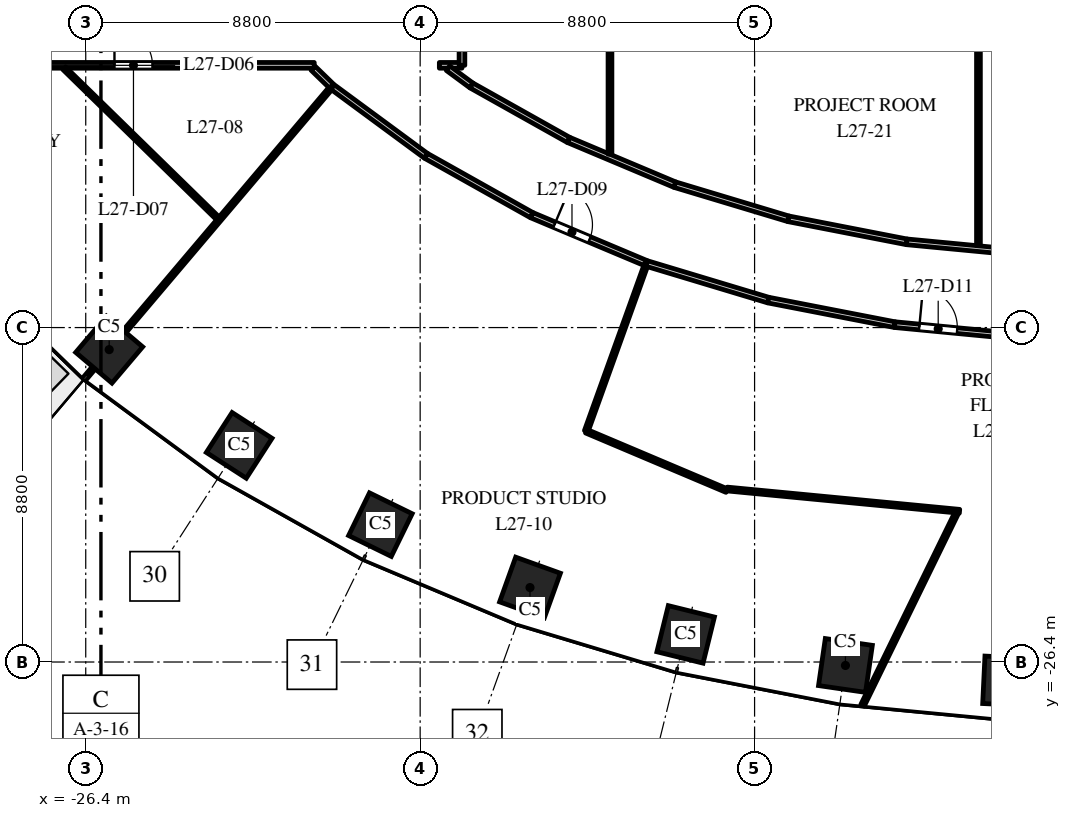
"""IFC4 building model, lengths in metres.
Left out: names, types, materials, properties, quantities, classifications, styles, units other than length and angle.
Written with IfcOpenShell. Run it as: python <this file> out.ifc"""

import sys

from ifc_helpers import new_model, si_unit, direction, frame, frame_2d, origin, origin_2d, place, context, subcontext, project, spatial, rectangle, extrude, element, fill, save


model = new_model("IFC4")
c1 = context("Model", 3, precision=1e-05, world=origin(), true_north=direction((0.0, 1.0)))
c2 = subcontext(c1, "Body", "Model", "MODEL_VIEW")
j1 = project(units=[si_unit("LENGTHUNIT", "METRE"), si_unit("PLANEANGLEUNIT", "RADIAN")], contexts=[c1])
p1 = place(None, origin())
s1 = spatial("IfcSite", under=j1, at=p1, CompositionType="ELEMENT")
p2 = place(p1, origin())
s2 = spatial("IfcBuilding", under=s1, at=p2, CompositionType="ELEMENT")
p3 = place(p2, frame((0.0, 0.0, 120.0)))
s3 = spatial("IfcBuildingStorey", under=s2, at=p3, CompositionType="ELEMENT", Elevation=120.0)
for number, where, z_axis, x_axis in (
    (1, (-25.783, -18.18, 0.0), (0.0, 0.0, 1.0), (0.763, -0.646, 0.0)),
    (2, (-22.362, -20.7, 0.0), (0.0, 0.0, 1.0), (0.84, -0.542, 0.0)),
    (3, (-18.646, -22.785, 0.0), (0.0, 0.0, 1.0), (0.898, -0.439, 0.0)),
    (4, (-14.709, -24.441, 0.0), (0.0, 0.0, 1.0), (0.941, -0.338, 0.0)),
    (5, (-10.613, -25.674, 0.0), (0.0, 0.0, 1.0), (0.971, -0.24, 0.0)),
    (6, (-6.409, -26.491, 0.0), (0.0, 0.0, 1.0), (0.99, -0.143, 0.0)),
    (7, (-2.143, -26.898, 0.0), (0.0, 0.0, 1.0), (0.999, -0.048, 0.0)),
):
    element("IfcColumn", number, at=place(p3, frame(where, z_axis=z_axis, x_axis=x_axis)), inside=s3, PredefinedType="COLUMN", context=c2, shape_type="SweptSolid", body=[
        extrude(rectangle(XDim=1.25, YDim=1.25, at=origin_2d()), origin(), (0.0, 0.0, 1.0), 4.0),
    ])
p4 = place(p3, frame((-31.5, -10.7, 0.0), z_axis=(0.0, 0.0, 1.0), x_axis=(1.0, 0.0, 0.0)))
e8 = element("IfcWall", 8, at=p4, inside=s3, PredefinedType="PARTITIONING", context=c2, shape_type="SweptSolid", body=[
    extrude(rectangle(XDim=11.113, YDim=0.15, at=frame_2d((5.557, 0.0))), origin(), (0.0, 0.0, 1.0), 3.1),
])
p5 = place(p4, frame((2.9, 0.0, 0.0)))
e9 = element("IfcOpeningElement", 9, at=p5, cuts=e8, PredefinedType="OPENING", context=c2, shape_type="SweptSolid", body=[
    extrude(rectangle(XDim=1.0, YDim=2.1, at=frame_2d((0.5, 1.05))), frame((0.0, 0.085, 0.0), z_axis=(0.0, -1.0, 0.0), x_axis=(1.0, 0.0, 0.0)), (0.0, 0.0, 1.0), 0.17),
])
p6 = place(p4, frame((5.856, 0.0, 0.0)))
e10 = element("IfcOpeningElement", 10, at=p6, cuts=e8, PredefinedType="OPENING", context=c2, shape_type="SweptSolid", body=[
    extrude(rectangle(XDim=1.0, YDim=2.1, at=frame_2d((0.5, 1.05))), frame((0.0, 0.085, 0.0), z_axis=(0.0, -1.0, 0.0), x_axis=(1.0, 0.0, 0.0)), (0.0, 0.0, 1.0), 0.17),
])
p7 = place(p3, frame((-26.965, -10.778, 0.0), z_axis=(0.0, 0.0, 1.0), x_axis=(0.715118482903, -0.699003258512, 0.0)))
e11 = element("IfcWall", 11, at=p7, inside=s3, PredefinedType="PARTITIONING", context=c2, shape_type="SweptSolid", body=[
    extrude(rectangle(XDim=5.651, YDim=0.1, at=frame_2d((2.825, 0.0))), origin(), (0.0, 0.0, 1.0), 3.7),
])
p8 = place(p3, frame((-26.43, -18.945, 0.0), z_axis=(0.0, 0.0, 1.0), x_axis=(0.64633128205, 0.763056927, 0.0)))
e12 = element("IfcWall", 12, at=p8, inside=s3, PredefinedType="PARTITIONING", context=c2, shape_type="SweptSolid", body=[
    extrude(rectangle(XDim=10.069, YDim=0.1, at=frame_2d((5.034, 0.0))), origin(), (0.0, 0.0, 1.0), 3.7),
])
p9 = place(p3, frame((-20.418, -10.775, 0.0), z_axis=(0.0, 0.0, 1.0), x_axis=(0.717145300924, -0.69692368116, 0.0)))
e13 = element("IfcWall", 13, at=p9, inside=s3, PredefinedType="PARTITIONING", context=c2, shape_type="SweptSolid", body=[
    extrude(rectangle(XDim=0.676, YDim=0.15, at=frame_2d((0.338, 0.0))), origin(), (0.0, 0.0, 1.0), 3.7),
])
p10 = place(p3, frame((-19.903, -11.272, 0.0), z_axis=(0.0, 0.0, 1.0), x_axis=(0.805228684186, -0.592964388613, 0.0)))
e14 = element("IfcWall", 14, at=p10, inside=s3, PredefinedType="PARTITIONING", context=c2, shape_type="SweptSolid", body=[
    extrude(rectangle(XDim=3.052, YDim=0.15, at=frame_2d((1.526, 0.0))), origin(), (0.0, 0.0, 1.0), 2.75),
])
p11 = place(p3, frame((-17.445, -13.082, 0.0), z_axis=(0.0, 0.0, 1.0), x_axis=(0.872072095629, -0.489377420837, 0.0)))
e15 = element("IfcWall", 15, at=p11, inside=s3, PredefinedType="PARTITIONING", context=c2, shape_type="SweptSolid", body=[
    extrude(rectangle(XDim=3.188, YDim=0.15, at=frame_2d((1.594, 0.0))), origin(), (0.0, 0.0, 1.0), 3.7),
])
p12 = place(p3, frame((-17.095, -10.7, 0.0), z_axis=(0.0, 0.0, 1.0), x_axis=(1.0, 0.0, 0.0)))
e16 = element("IfcWall", 16, at=p12, inside=s3, PredefinedType="PARTITIONING", context=c2, shape_type="SweptSolid", body=[
    extrude(rectangle(XDim=0.595, YDim=0.15, at=frame_2d((0.297, 0.0))), origin(), (0.0, 0.0, 1.0), 3.7),
])
p13 = place(p3, frame((-16.867, -10.775, 0.0), z_axis=(0.0, 0.0, 1.0), x_axis=(0.804751563869, -0.593611759023, 0.0)))
e17 = element("IfcWall", 17, at=p13, inside=s3, PredefinedType="PARTITIONING", context=c2, shape_type="SweptSolid", body=[
    extrude(rectangle(XDim=0.767, YDim=0.15, at=frame_2d((0.383, 0.0))), origin(), (0.0, 0.0, 1.0), 3.7),
])
p14 = place(p3, frame((-16.5, -10.7, 0.0), z_axis=(0.0, 0.0, 1.0), x_axis=(0.0, 1.0, 0.0)))
e18 = element("IfcWall", 18, at=p14, inside=s3, PredefinedType="PARTITIONING", context=c2, shape_type="SweptSolid", body=[
    extrude(rectangle(XDim=0.736, YDim=0.15, at=frame_2d((0.368, 0.0))), origin(), (0.0, 0.0, 1.0), 3.7),
])
p15 = place(p3, frame((-16.25, -11.23, 0.0), z_axis=(0.0, 0.0, 1.0), x_axis=(0.872147381065, -0.489243237767, 0.0)))
e19 = element("IfcWall", 19, at=p15, inside=s3, PredefinedType="PARTITIONING", context=c2, shape_type="SweptSolid", body=[
    extrude(rectangle(XDim=2.927, YDim=0.15, at=frame_2d((1.464, 0.0))), origin(), (0.0, 0.0, 1.0), 2.75),
])
p16 = place(p3, frame((-14.665, -14.642, 0.0), z_axis=(0.0, 0.0, 1.0), x_axis=(0.921850993012, -0.387544509293, 0.0)))
e20 = element("IfcWall", 20, at=p16, inside=s3, PredefinedType="PARTITIONING", context=c2, shape_type="SweptSolid", body=[
    extrude(rectangle(XDim=3.259, YDim=0.15, at=frame_2d((1.629, 0.0))), origin(), (0.0, 0.0, 1.0), 2.85),
])
p17 = place(p16, frame((0.65, 0.0, 0.0)))
e21 = element("IfcOpeningElement", 21, at=p17, cuts=e20, PredefinedType="OPENING", context=c2, shape_type="SweptSolid", body=[
    extrude(rectangle(XDim=1.0, YDim=2.1, at=frame_2d((0.5, 1.05))), frame((0.0, 0.085, 0.0), z_axis=(0.0, -1.0, 0.0), x_axis=(1.0, 0.0, 0.0)), (0.0, 0.0, 1.0), 0.17),
])
p18 = place(p3, frame((-13.697, -12.662, 0.0), z_axis=(0.0, 0.0, 1.0), x_axis=(0.921751821358, -0.387780324183, 0.0)))
e22 = element("IfcWall", 22, at=p18, inside=s3, PredefinedType="PARTITIONING", context=c2, shape_type="SweptSolid", body=[
    extrude(rectangle(XDim=3.038, YDim=0.15, at=frame_2d((1.519, 0.0))), origin(), (0.0, 0.0, 1.0), 2.85),
])
p19 = place(p3, frame((-13.23, -20.327, 0.0), z_axis=(0.0, 0.0, 1.0), x_axis=(0.338411379185, 0.940998266969, 0.0)))
e23 = element("IfcWall", 23, at=p19, inside=s3, PredefinedType="PARTITIONING", context=c2, shape_type="SweptSolid", body=[
    extrude(rectangle(XDim=4.687, YDim=0.1, at=frame_2d((2.343, 0.0))), origin(), (0.0, 0.0, 1.0), 3.7),
])
p20 = place(p3, frame((-13.23, -20.327, 0.0), z_axis=(0.0, 0.0, 1.0), x_axis=(0.921068797825, -0.389399884017, 0.0)))
e24 = element("IfcWall", 24, at=p20, inside=s3, PredefinedType="PARTITIONING", context=c2, shape_type="SweptSolid", body=[
    extrude(rectangle(XDim=4.014, YDim=0.1, at=frame_2d((2.007, 0.0))), origin(), (0.0, 0.0, 1.0), 3.7),
])
p21 = place(p3, frame((-12.605, -13.036, 0.0), z_axis=(0.0, 0.0, 1.0), x_axis=(0.0, 1.0, 0.0)))
e25 = element("IfcWall", 25, at=p21, inside=s3, PredefinedType="PARTITIONING", context=c2, shape_type="SweptSolid", body=[
    extrude(rectangle(XDim=26.072, YDim=0.1, at=frame_2d((13.036, 0.0))), origin(), (0.0, 0.0, 1.0), 2.75),
])
p22 = place(p3, frame((-11.643, -15.913, 0.0), z_axis=(0.0, 0.0, 1.0), x_axis=(0.957584891346, -0.288151307243, 0.0)))
e26 = element("IfcWall", 26, at=p22, inside=s3, PredefinedType="PARTITIONING", context=c2, shape_type="SweptSolid", body=[
    extrude(rectangle(XDim=3.345, YDim=0.15, at=frame_2d((1.672, 0.0))), origin(), (0.0, 0.0, 1.0), 3.7),
])
p23 = place(p3, frame((-10.897, -13.84, 0.0), z_axis=(0.0, 0.0, 1.0), x_axis=(0.957606118849, -0.28808075455, 0.0)))
e27 = element("IfcWall", 27, at=p23, inside=s3, PredefinedType="PARTITIONING", context=c2, shape_type="SweptSolid", body=[
    extrude(rectangle(XDim=3.117, YDim=0.15, at=frame_2d((1.559, 0.0))), origin(), (0.0, 0.0, 1.0), 3.7),
])
p24 = place(p3, frame((-9.523, -21.848, 0.0), z_axis=(0.0, 0.0, 1.0), x_axis=(0.995438322378, -0.095407265659, 0.0)))
e28 = element("IfcWall", 28, at=p24, inside=s3, PredefinedType="PARTITIONING", context=c2, shape_type="SweptSolid", body=[
    extrude(rectangle(XDim=6.144, YDim=0.1, at=frame_2d((3.072, 0.0))), origin(), (0.0, 0.0, 1.0), 2.85),
])
p25 = place(p3, frame((-8.44, -16.877, 0.0), z_axis=(0.0, 0.0, 1.0), x_axis=(0.981665220565, -0.190613207134, 0.0)))
e29 = element("IfcWall", 29, at=p25, inside=s3, PredefinedType="PARTITIONING", context=c2, shape_type="SweptSolid", body=[
    extrude(rectangle(XDim=3.389, YDim=0.15, at=frame_2d((1.695, 0.0))), origin(), (0.0, 0.0, 1.0), 2.85),
])
p26 = place(p3, frame((-7.912, -14.738, 0.0), z_axis=(0.0, 0.0, 1.0), x_axis=(0.981588545092, -0.191007665145, 0.0)))
e30 = element("IfcWall", 30, at=p26, inside=s3, PredefinedType="PARTITIONING", context=c2, shape_type="SweptSolid", body=[
    extrude(rectangle(XDim=3.172, YDim=0.15, at=frame_2d((1.586, 0.0))), origin(), (0.0, 0.0, 1.0), 2.85),
])
p27 = place(p3, frame((-5.958, -27.538, 0.0), z_axis=(0.0, 0.0, 1.0), x_axis=(0.439326712168, 0.8983273568, 0.0)))
e31 = element("IfcWall", 31, at=p27, inside=s3, PredefinedType="PARTITIONING", context=c2, shape_type="SweptSolid", body=[
    extrude(rectangle(XDim=5.634, YDim=0.1, at=frame_2d((2.817, 0.0))), origin(), (0.0, 0.0, 1.0), 2.9),
])
p28 = place(p3, frame((-5.113, -17.523, 0.0), z_axis=(0.0, 0.0, 1.0), x_axis=(0.995466844572, -0.095109207532, 0.0)))
e32 = element("IfcWall", 32, at=p28, inside=s3, PredefinedType="PARTITIONING", context=c2, shape_type="SweptSolid", body=[
    extrude(rectangle(XDim=3.417, YDim=0.15, at=frame_2d((1.708, 0.0))), origin(), (0.0, 0.0, 1.0), 3.7),
])
p29 = place(p28, frame((0.65, 0.0, 0.0)))
e33 = element("IfcOpeningElement", 33, at=p29, cuts=e32, PredefinedType="OPENING", context=c2, shape_type="SweptSolid", body=[
    extrude(rectangle(XDim=1.0, YDim=2.1, at=frame_2d((0.5, 1.05))), frame((0.0, 0.085, 0.0), z_axis=(0.0, -1.0, 0.0), x_axis=(1.0, 0.0, 0.0)), (0.0, 0.0, 1.0), 0.17),
])
p30 = place(p3, frame((-4.798, -15.344, 0.0), z_axis=(0.0, 0.0, 1.0), x_axis=(0.995491705426, -0.09484863957, 0.0)))
e34 = element("IfcWall", 34, at=p30, inside=s3, PredefinedType="PARTITIONING", context=c2, shape_type="SweptSolid", body=[
    extrude(rectangle(XDim=3.205, YDim=0.15, at=frame_2d((1.602, 0.0))), origin(), (0.0, 0.0, 1.0), 3.7),
])
p31 = place(p3, frame((-2.909, -15.445, 0.0), z_axis=(0.0, 0.0, 1.0), x_axis=(0.0, 1.0, 0.0)))
e35 = element("IfcWall", 35, at=p31, inside=s3, PredefinedType="PARTITIONING", context=c2, shape_type="SweptSolid", body=[
    extrude(rectangle(XDim=8.363, YDim=0.1, at=frame_2d((4.182, 0.0))), origin(), (0.0, 0.0, 1.0), 2.9),
])
p32 = place(p6, origin())
e36 = element("IfcDoor", 36, at=p32, inside=s3, OperationType="SINGLE_SWING_LEFT", PredefinedType="DOOR", context=c2, shape_type="SweptSolid", body=[
    extrude(rectangle(XDim=1.0, YDim=2.1, at=frame_2d((0.5, 1.05))), frame((0.0, 0.025, 0.0), z_axis=(0.0, -1.0, 0.0), x_axis=(1.0, 0.0, 0.0)), (0.0, 0.0, 1.0), 0.05),
])
fill(e10, e36)
p33 = place(p17, origin())
e37 = element("IfcDoor", 37, at=p33, inside=s3, OperationType="SINGLE_SWING_LEFT", PredefinedType="DOOR", context=c2, shape_type="SweptSolid", body=[
    extrude(rectangle(XDim=1.0, YDim=2.1, at=frame_2d((0.5, 1.05))), frame((0.0, 0.025, 0.0), z_axis=(0.0, -1.0, 0.0), x_axis=(1.0, 0.0, 0.0)), (0.0, 0.0, 1.0), 0.05),
])
fill(e21, e37)
p34 = place(p29, origin())
e38 = element("IfcDoor", 38, at=p34, inside=s3, OperationType="SINGLE_SWING_LEFT", PredefinedType="DOOR", context=c2, shape_type="SweptSolid", body=[
    extrude(rectangle(XDim=1.0, YDim=2.1, at=frame_2d((0.5, 1.05))), frame((0.0, 0.025, 0.0), z_axis=(0.0, -1.0, 0.0), x_axis=(1.0, 0.0, 0.0)), (0.0, 0.0, 1.0), 0.05),
])
fill(e33, e38)
save(model, sys.argv[1])
